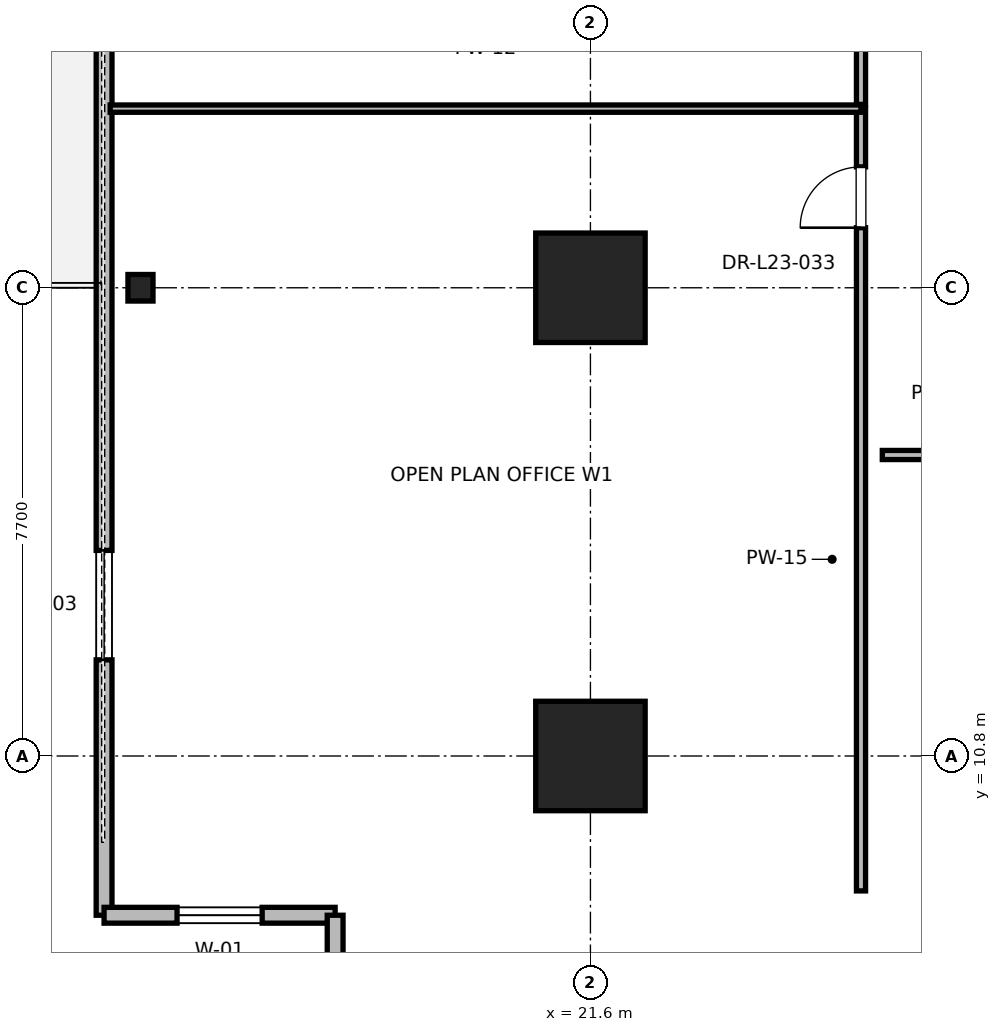
"""IFC4 building model, lengths in metres.
Left out: names, types, materials, properties, quantities, classifications, styles, units other than length and angle.
Written with IfcOpenShell. Run it as: python <this file> out.ifc"""

import sys

from ifc_helpers import new_model, si_unit, direction, frame, frame_2d, origin, origin_2d, place, context, subcontext, project, spatial, rectangle, i_section, extrude, element, fill, save


model = new_model("IFC4")
c1 = context("Model", 3, precision=1e-05, world=origin(), true_north=direction((0.0, 1.0)))
c2 = subcontext(c1, "Body", "Model", "MODEL_VIEW")
j1 = project(units=[si_unit("LENGTHUNIT", "METRE"), si_unit("PLANEANGLEUNIT", "RADIAN")], contexts=[c1])
p1 = place(None, origin())
s1 = spatial("IfcSite", under=j1, at=p1, CompositionType="ELEMENT")
p2 = place(p1, origin())
s2 = spatial("IfcBuilding", under=s1, at=p2, CompositionType="ELEMENT")
p3 = place(p2, frame((0.0, 0.0, 99.6)))
s3 = spatial("IfcBuildingStorey", under=s2, at=p3, CompositionType="ELEMENT", Elevation=99.6)
for number, where, z_axis, x_axis in (
    (1, (21.6, 18.5, 0.0), (0.0, 0.0, 1.0), (1.0, 0.0, 0.0)),
    (2, (21.6, 10.8, 0.0), (0.0, 0.0, 1.0), (1.0, 0.0, 0.0)),
):
    element("IfcColumn", number, at=place(p3, frame(where, z_axis=z_axis, x_axis=x_axis)), inside=s3, PredefinedType="COLUMN", context=c2, shape_type="SweptSolid", body=[
        extrude(rectangle(XDim=1.8, YDim=1.8, at=origin_2d()), origin(), (0.0, 0.0, 1.0), 4.0),
    ])
p4 = place(p3, frame((14.2, 18.5, 0.0), z_axis=(0.0, 0.0, 1.0), x_axis=(1.0, 0.0, 0.0)))
e3 = element("IfcColumn", 3, at=p4, inside=s3, PredefinedType="COLUMN", context=c2, shape_type="SweptSolid", body=[
    extrude(i_section(OverallWidth=0.412, OverallDepth=0.437, WebThickness=0.036, FlangeThickness=0.058, FilletRadius=0.015, at=origin_2d()), origin(), (0.0, 0.0, 1.0), 4.0),
])
p5 = place(p3, frame((13.601, 46.819, 0.0), z_axis=(0.0, 0.0, 1.0), x_axis=(0.0, -1.0, 0.0)))
e4 = element("IfcWall", 4, at=p5, inside=s3, PredefinedType="PARAPET", context=c2, shape_type="SweptSolid", body=[
    extrude(rectangle(XDim=38.638, YDim=0.26, at=frame_2d((19.319, 0.0))), origin(), (0.0, 0.0, 1.0), 3.273),
])
p6 = place(p5, frame((4.2, 0.0, 0.85)))
e5 = element("IfcOpeningElement", 5, at=p6, cuts=e4, PredefinedType="OPENING", context=c2, shape_type="SweptSolid", body=[
    extrude(rectangle(XDim=1.8, YDim=2.2, at=frame_2d((0.9, 1.1))), frame((0.0, 0.13, 0.0), z_axis=(0.0, -1.0, 0.0), x_axis=(1.0, 0.0, 0.0)), (0.0, 0.0, 1.0), 0.26),
])
p7 = place(p5, frame((18.719, 0.0, 0.0)))
e6 = element("IfcOpeningElement", 6, at=p7, cuts=e4, PredefinedType="OPENING", context=c2, shape_type="SweptSolid", body=[
    extrude(rectangle(XDim=1.2, YDim=2.2, at=frame_2d((0.6, 1.1))), frame((0.0, 0.13, 0.0), z_axis=(0.0, -1.0, 0.0), x_axis=(1.0, 0.0, 0.0)), (0.0, 0.0, 1.0), 0.26),
])
p8 = place(p5, frame((32.638, 0.0, 0.85)))
e7 = element("IfcOpeningElement", 7, at=p8, cuts=e4, PredefinedType="OPENING", context=c2, shape_type="SweptSolid", body=[
    extrude(rectangle(XDim=1.8, YDim=2.2, at=frame_2d((0.9, 1.1))), frame((0.0, 0.13, 0.0), z_axis=(0.0, -1.0, 0.0), x_axis=(1.0, 0.0, 0.0)), (0.0, 0.0, 1.0), 0.26),
])
p9 = place(p3, frame((13.601, 8.181, 0.0), z_axis=(0.0, 0.0, 1.0), x_axis=(1.0, 0.0, 0.0)))
e8 = element("IfcWall", 8, at=p9, inside=s3, PredefinedType="PARAPET", context=c2, shape_type="SweptSolid", body=[
    extrude(rectangle(XDim=3.8, YDim=0.26, at=frame_2d((1.9, 0.0))), origin(), (0.0, 0.0, 1.0), 3.76),
])
p10 = place(p9, frame((1.2, 0.0, 0.85)))
e9 = element("IfcOpeningElement", 9, at=p10, cuts=e8, PredefinedType="OPENING", context=c2, shape_type="SweptSolid", body=[
    extrude(rectangle(XDim=1.4, YDim=2.0, at=frame_2d((0.7, 1.0))), frame((0.0, 0.13, 0.0), z_axis=(0.0, -1.0, 0.0), x_axis=(1.0, 0.0, 0.0)), (0.0, 0.0, 1.0), 0.26),
])
p11 = place(p3, frame((17.401, 8.181, 0.0), z_axis=(0.0, 0.0, 1.0), x_axis=(0.0, -1.0, 0.0)))
e10 = element("IfcWall", 10, at=p11, inside=s3, PredefinedType="PARAPET", context=c2, shape_type="SweptSolid", body=[
    extrude(rectangle(XDim=3.4, YDim=0.26, at=frame_2d((1.7, 0.0))), origin(), (0.0, 0.0, 1.0), 3.76),
])
p12 = place(p3, frame((26.4, 15.75, 0.0), z_axis=(0.0, 0.0, 1.0), x_axis=(1.0, 0.0, 0.0)))
e11 = element("IfcWall", 11, at=p12, inside=s3, PredefinedType="PARTITIONING", context=c2, shape_type="SweptSolid", body=[
    extrude(rectangle(XDim=4.896, YDim=0.15, at=frame_2d((2.448, 0.0))), origin(), (0.0, 0.0, 1.0), 2.85),
])
p13 = place(p12, frame((1.963, 0.0, 0.0)))
e12 = element("IfcOpeningElement", 12, at=p13, cuts=e11, PredefinedType="OPENING", context=c2, shape_type="SweptSolid", body=[
    extrude(rectangle(XDim=1.0, YDim=2.15, at=frame_2d((0.5, 1.075))), frame((0.0, 0.075, 0.0), z_axis=(0.0, -1.0, 0.0), x_axis=(1.0, 0.0, 0.0)), (0.0, 0.0, 1.0), 0.15),
])
p14 = place(p3, frame((26.05, 8.581, 0.0), z_axis=(0.0, 0.0, 1.0), x_axis=(0.0, 1.0, 0.0)))
e13 = element("IfcWall", 13, at=p14, inside=s3, PredefinedType="PARTITIONING", context=c2, shape_type="SweptSolid", body=[
    extrude(rectangle(XDim=12.865, YDim=0.15, at=frame_2d((6.432, 0.0))), origin(), (0.0, 0.0, 1.0), 2.85),
])
p15 = place(p14, frame((10.907, 0.0, 0.0)))
e14 = element("IfcOpeningElement", 14, at=p15, cuts=e13, PredefinedType="OPENING", context=c2, shape_type="SweptSolid", body=[
    extrude(rectangle(XDim=1.0, YDim=2.15, at=frame_2d((0.5, 1.075))), frame((0.0, 0.075, 0.0), z_axis=(0.0, -1.0, 0.0), x_axis=(1.0, 0.0, 0.0)), (0.0, 0.0, 1.0), 0.15),
])
p16 = place(p3, frame((13.701, 21.446, 0.0), z_axis=(0.0, 0.0, 1.0), x_axis=(1.0, 0.0, 0.0)))
e15 = element("IfcWall", 15, at=p16, inside=s3, PredefinedType="PARTITIONING", context=c2, shape_type="SweptSolid", body=[
    extrude(rectangle(XDim=12.349, YDim=0.12, at=frame_2d((6.174, 0.0))), origin(), (0.0, 0.0, 1.0), 2.85),
])
p17 = place(p3, frame((26.05, 21.516, 0.0), z_axis=(0.0, 0.0, 1.0), x_axis=(0.0, 1.0, 0.0)))
e16 = element("IfcWall", 16, at=p17, inside=s3, PredefinedType="PARTITIONING", context=c2, shape_type="SweptSolid", body=[
    extrude(rectangle(XDim=12.795, YDim=0.15, at=frame_2d((6.397, 0.0))), origin(), (0.0, 0.0, 1.0), 2.85),
])
p18 = place(p17, frame((5.837, 0.0, 0.0)))
e17 = element("IfcOpeningElement", 17, at=p18, cuts=e16, PredefinedType="OPENING", context=c2, shape_type="SweptSolid", body=[
    extrude(rectangle(XDim=1.05, YDim=2.2, at=frame_2d((0.525, 1.1))), frame((0.0, 0.075, 0.0), z_axis=(0.0, -1.0, 0.0), x_axis=(1.0, 0.0, 0.0)), (0.0, 0.0, 1.0), 0.15),
])
p19 = place(p8, origin())
e18 = element("IfcWindow", 18, at=p19, inside=s3, PartitioningType="SINGLE_PANEL", PredefinedType="WINDOW", context=c2, shape_type="SweptSolid", body=[
    extrude(rectangle(XDim=1.8, YDim=2.2, at=frame_2d((0.9, 1.1))), frame((0.0, 0.03, 0.0), z_axis=(0.0, -1.0, 0.0), x_axis=(1.0, 0.0, 0.0)), (0.0, 0.0, 1.0), 0.06),
])
fill(e7, e18)
p20 = place(p10, origin())
e19 = element("IfcWindow", 19, at=p20, inside=s3, PartitioningType="SINGLE_PANEL", PredefinedType="WINDOW", context=c2, shape_type="SweptSolid", body=[
    extrude(rectangle(XDim=1.4, YDim=2.0, at=frame_2d((0.7, 1.0))), frame((0.0, 0.03, 0.0), z_axis=(0.0, -1.0, 0.0), x_axis=(1.0, 0.0, 0.0)), (0.0, 0.0, 1.0), 0.06),
])
fill(e9, e19)
p21 = place(p15, origin())
e20 = element("IfcDoor", 20, at=p21, inside=s3, OperationType="SINGLE_SWING_LEFT", PredefinedType="DOOR", context=c2, shape_type="SweptSolid", body=[
    extrude(rectangle(XDim=1.0, YDim=2.15, at=frame_2d((0.5, 1.075))), frame((0.0, 0.025, 0.0), z_axis=(0.0, -1.0, 0.0), x_axis=(1.0, 0.0, 0.0)), (0.0, 0.0, 1.0), 0.05),
])
fill(e14, e20)
save(model, sys.argv[1])
